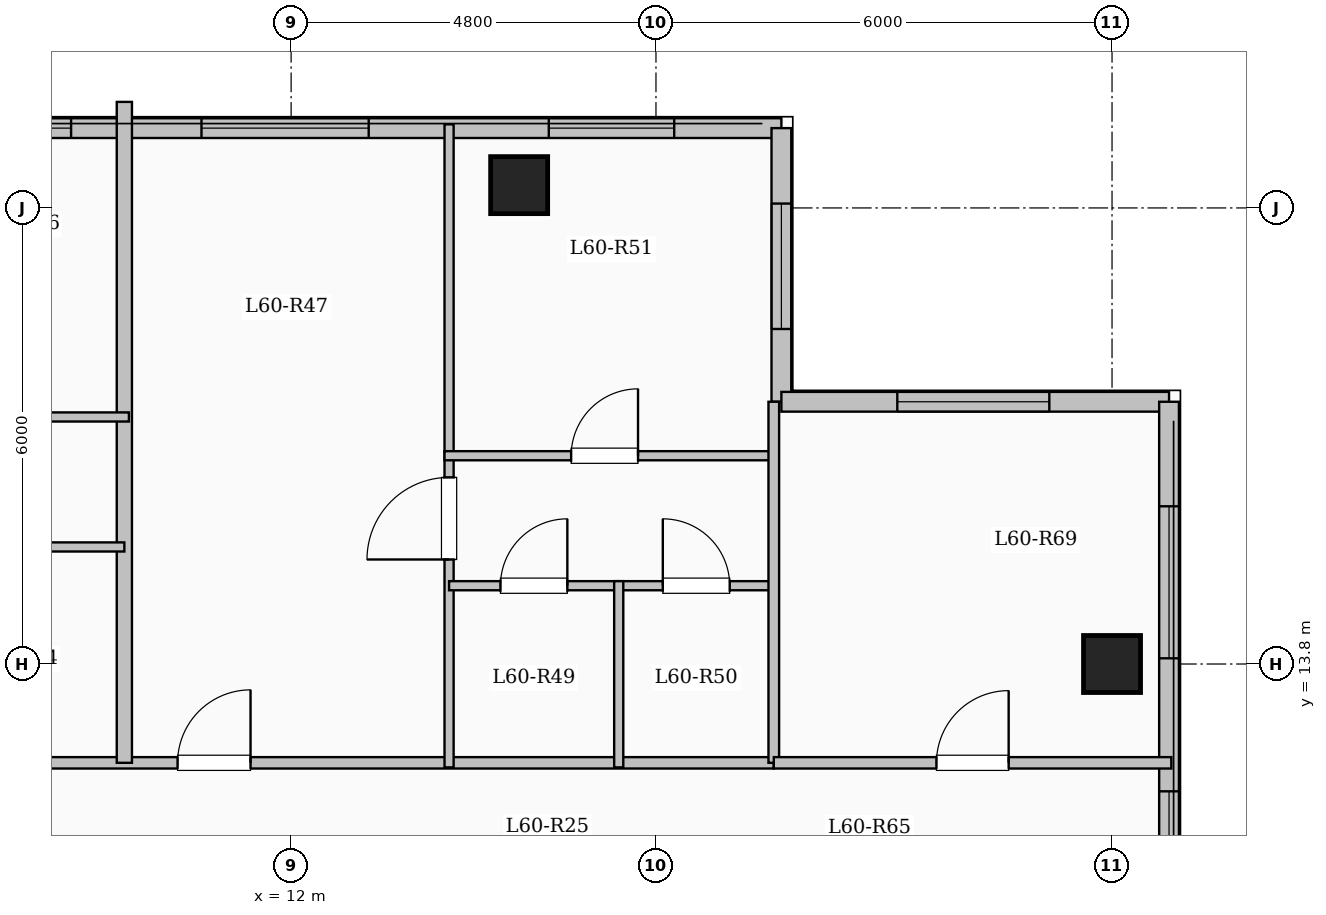
"""IFC4 building model, lengths in metres.
Left out: names, types, materials, properties, quantities, classifications, styles, units other than length and angle.
Written with IfcOpenShell. Run it as: python <this file> out.ifc"""

import sys

from ifc_helpers import new_model, si_unit, direction, frame, frame_2d, origin, origin_2d, place, context, subcontext, project, spatial, rectangle, extrude, element, fill, save


model = new_model("IFC4")
c1 = context("Model", 3, precision=1e-05, world=origin(), true_north=direction((0.0, 1.0)))
c2 = subcontext(c1, "Body", "Model", "MODEL_VIEW")
j1 = project(units=[si_unit("LENGTHUNIT", "METRE"), si_unit("PLANEANGLEUNIT", "RADIAN")], contexts=[c1])
p1 = place(None, origin())
s1 = spatial("IfcSite", under=j1, at=p1, CompositionType="ELEMENT")
p2 = place(p1, origin())
s2 = spatial("IfcBuilding", under=s1, at=p2, CompositionType="ELEMENT")
p3 = place(p2, frame((0.0, 0.0, 220.4)))
s3 = spatial("IfcBuildingStorey", under=s2, at=p3, CompositionType="ELEMENT", Elevation=220.4)
for number, where, z_axis, x_axis in (
    (1, (15.0, 20.1, 0.0), (0.0, 0.0, 1.0), (1.0, 0.0, 0.0)),
    (2, (22.8, 13.8, 0.0), (0.0, 0.0, 1.0), (1.0, 0.0, 0.0)),
):
    element("IfcColumn", number, at=place(p3, frame(where, z_axis=z_axis, x_axis=x_axis)), inside=s3, PredefinedType="COLUMN", context=c2, shape_type="SweptSolid", body=[
        extrude(rectangle(XDim=0.75, YDim=0.75, at=origin_2d()), origin(), (0.0, 0.0, 1.0), 3.35),
    ])
p4 = place(p3, frame((7.35, 20.85, 0.0), z_axis=(0.0, 0.0, 1.0), x_axis=(1.0, 0.0, 0.0)))
e3 = element("IfcWall", 3, at=p4, inside=s3, PredefinedType="SOLIDWALL", context=c2, shape_type="SweptSolid", body=[
    extrude(rectangle(XDim=11.1, YDim=0.26, at=frame_2d((5.55, 0.0))), origin(), (0.0, 0.0, 1.0), 3.1),
])
p5 = place(p4, frame((0.555, 0.0, 0.95)))
e4 = element("IfcOpeningElement", 4, at=p5, cuts=e3, PredefinedType="OPENING", context=c2, shape_type="SweptSolid", body=[
    extrude(rectangle(XDim=1.2, YDim=1.5, at=frame_2d((0.6, 0.75))), frame((0.0, 0.14, 0.0), z_axis=(0.0, -1.0, 0.0), x_axis=(1.0, 0.0, 0.0)), (0.0, 0.0, 1.0), 0.28),
])
p6 = place(p4, frame((3.471, 0.0, 0.9)))
e5 = element("IfcOpeningElement", 5, at=p6, cuts=e3, PredefinedType="OPENING", context=c2, shape_type="SweptSolid", body=[
    extrude(rectangle(XDim=2.2, YDim=1.75, at=frame_2d((1.1, 0.875))), frame((0.0, 0.14, 0.0), z_axis=(0.0, -1.0, 0.0), x_axis=(1.0, 0.0, 0.0)), (0.0, 0.0, 1.0), 0.28),
])
p7 = place(p4, frame((8.04, 0.0, 0.9)))
e6 = element("IfcOpeningElement", 6, at=p7, cuts=e3, PredefinedType="OPENING", context=c2, shape_type="SweptSolid", body=[
    extrude(rectangle(XDim=1.65, YDim=1.6, at=frame_2d((0.825, 0.8))), frame((0.0, 0.14, 0.0), z_axis=(0.0, -1.0, 0.0), x_axis=(1.0, 0.0, 0.0)), (0.0, 0.0, 1.0), 0.28),
])
p8 = place(p3, frame((18.45, 20.85, 0.0), z_axis=(0.0, 0.0, 1.0), x_axis=(0.0, -1.0, 0.0)))
e7 = element("IfcWall", 7, at=p8, inside=s3, PredefinedType="SOLIDWALL", context=c2, shape_type="SweptSolid", body=[
    extrude(rectangle(XDim=3.6, YDim=0.26, at=frame_2d((1.8, 0.0))), origin(), (0.0, 0.0, 1.0), 3.1),
])
p9 = place(p8, frame((0.992, 0.0, 0.9)))
e8 = element("IfcOpeningElement", 8, at=p9, cuts=e7, PredefinedType="OPENING", context=c2, shape_type="SweptSolid", body=[
    extrude(rectangle(XDim=1.65, YDim=1.6, at=frame_2d((0.825, 0.8))), frame((0.0, 0.14, 0.0), z_axis=(0.0, -1.0, 0.0), x_axis=(1.0, 0.0, 0.0)), (0.0, 0.0, 1.0), 0.28),
])
p10 = place(p3, frame((18.45, 17.25, 0.0), z_axis=(0.0, 0.0, 1.0), x_axis=(1.0, 0.0, 0.0)))
e9 = element("IfcWall", 9, at=p10, inside=s3, PredefinedType="SOLIDWALL", context=c2, shape_type="SweptSolid", body=[
    extrude(rectangle(XDim=5.1, YDim=0.26, at=frame_2d((2.55, 0.0))), origin(), (0.0, 0.0, 1.0), 3.1),
])
p11 = place(p10, frame((1.525, 0.0, 0.9)))
e10 = element("IfcOpeningElement", 10, at=p11, cuts=e9, PredefinedType="OPENING", context=c2, shape_type="SweptSolid", body=[
    extrude(rectangle(XDim=2.0, YDim=1.7, at=frame_2d((1.0, 0.85))), frame((0.0, 0.14, 0.0), z_axis=(0.0, -1.0, 0.0), x_axis=(1.0, 0.0, 0.0)), (0.0, 0.0, 1.0), 0.28),
])
p12 = place(p3, frame((23.55, 17.25, 0.0), z_axis=(0.0, 0.0, 1.0), x_axis=(0.0, -1.0, 0.0)))
e11 = element("IfcWall", 11, at=p12, inside=s3, PredefinedType="SOLIDWALL", context=c2, shape_type="SweptSolid", body=[
    extrude(rectangle(XDim=34.5, YDim=0.26, at=frame_2d((17.25, 0.0))), origin(), (0.0, 0.0, 1.0), 3.1),
])
p13 = place(p12, frame((1.375, 0.0, 0.9)))
e12 = element("IfcOpeningElement", 12, at=p13, cuts=e11, PredefinedType="OPENING", context=c2, shape_type="SweptSolid", body=[
    extrude(rectangle(XDim=2.0, YDim=1.7, at=frame_2d((1.0, 0.85))), frame((0.0, 0.14, 0.0), z_axis=(0.0, -1.0, 0.0), x_axis=(1.0, 0.0, 0.0)), (0.0, 0.0, 1.0), 0.28),
])
p14 = place(p12, frame((5.125, 0.0, 0.95)))
e13 = element("IfcOpeningElement", 13, at=p14, cuts=e11, PredefinedType="OPENING", context=c2, shape_type="SweptSolid", body=[
    extrude(rectangle(XDim=1.0, YDim=1.5, at=frame_2d((0.5, 0.75))), frame((0.0, 0.14, 0.0), z_axis=(0.0, -1.0, 0.0), x_axis=(1.0, 0.0, 0.0)), (0.0, 0.0, 1.0), 0.28),
])
p15 = place(p12, frame((8.375, 0.0, 0.9)))
e14 = element("IfcOpeningElement", 14, at=p15, cuts=e11, PredefinedType="OPENING", context=c2, shape_type="SweptSolid", body=[
    extrude(rectangle(XDim=2.0, YDim=1.7, at=frame_2d((1.0, 0.85))), frame((0.0, 0.14, 0.0), z_axis=(0.0, -1.0, 0.0), x_axis=(1.0, 0.0, 0.0)), (0.0, 0.0, 1.0), 0.28),
])
p16 = place(p12, frame((13.2, 0.0, 0.9)))
e15 = element("IfcOpeningElement", 15, at=p16, cuts=e11, PredefinedType="OPENING", context=c2, shape_type="SweptSolid", body=[
    extrude(rectangle(XDim=1.65, YDim=1.6, at=frame_2d((0.825, 0.8))), frame((0.0, 0.14, 0.0), z_axis=(0.0, -1.0, 0.0), x_axis=(1.0, 0.0, 0.0)), (0.0, 0.0, 1.0), 0.28),
])
p17 = place(p12, frame((19.05, 0.0, 0.9)))
e16 = element("IfcOpeningElement", 16, at=p17, cuts=e11, PredefinedType="OPENING", context=c2, shape_type="SweptSolid", body=[
    extrude(rectangle(XDim=2.2, YDim=1.75, at=frame_2d((1.1, 0.875))), frame((0.0, 0.14, 0.0), z_axis=(0.0, -1.0, 0.0), x_axis=(1.0, 0.0, 0.0)), (0.0, 0.0, 1.0), 0.28),
])
p18 = place(p12, frame((24.975, 0.0, 0.95)))
e17 = element("IfcOpeningElement", 17, at=p18, cuts=e11, PredefinedType="OPENING", context=c2, shape_type="SweptSolid", body=[
    extrude(rectangle(XDim=1.2, YDim=1.5, at=frame_2d((0.6, 0.75))), frame((0.0, 0.14, 0.0), z_axis=(0.0, -1.0, 0.0), x_axis=(1.0, 0.0, 0.0)), (0.0, 0.0, 1.0), 0.28),
])
p19 = place(p12, frame((29.475, 0.0, 0.9)))
e18 = element("IfcOpeningElement", 18, at=p19, cuts=e11, PredefinedType="OPENING", context=c2, shape_type="SweptSolid", body=[
    extrude(rectangle(XDim=2.2, YDim=1.75, at=frame_2d((1.1, 0.875))), frame((0.0, 0.14, 0.0), z_axis=(0.0, -1.0, 0.0), x_axis=(1.0, 0.0, 0.0)), (0.0, 0.0, 1.0), 0.28),
])
p20 = place(p3, frame((3.85, 12.5, 0.0), z_axis=(0.0, 0.0, 1.0), x_axis=(1.0, 0.0, 0.0)))
e19 = element("IfcWall", 19, at=p20, inside=s3, PredefinedType="PARTITIONING", context=c2, shape_type="SweptSolid", body=[
    extrude(rectangle(XDim=14.5, YDim=0.15, at=frame_2d((7.25, 0.0))), origin(), (0.0, 0.0, 1.0), 3.1),
])
p21 = place(p20, frame((0.7, 0.0, 0.0)))
e20 = element("IfcOpeningElement", 20, at=p21, cuts=e19, PredefinedType="OPENING", context=c2, shape_type="SweptSolid", body=[
    extrude(rectangle(XDim=0.96, YDim=2.15, at=frame_2d((0.48, 1.075))), frame((0.0, 0.085, 0.0), z_axis=(0.0, -1.0, 0.0), x_axis=(1.0, 0.0, 0.0)), (0.0, 0.0, 1.0), 0.17),
])
p22 = place(p20, frame((6.656, 0.0, 0.0)))
e21 = element("IfcOpeningElement", 21, at=p22, cuts=e19, PredefinedType="OPENING", context=c2, shape_type="SweptSolid", body=[
    extrude(rectangle(XDim=0.96, YDim=2.15, at=frame_2d((0.48, 1.075))), frame((0.0, 0.085, 0.0), z_axis=(0.0, -1.0, 0.0), x_axis=(1.0, 0.0, 0.0)), (0.0, 0.0, 1.0), 0.17),
])
p23 = place(p3, frame((9.806, 12.5, 0.0), z_axis=(0.0, 0.0, 1.0), x_axis=(0.0, 1.0, 0.0)))
e22 = element("IfcWall", 22, at=p23, inside=s3, PredefinedType="SOLIDWALL", context=c2, shape_type="SweptSolid", body=[
    extrude(rectangle(XDim=8.695, YDim=0.2, at=frame_2d((4.348, 0.0))), origin(), (0.0, 0.0, 1.0), 3.1),
])
p24 = place(p3, frame((6.95, 15.34, 0.0), z_axis=(0.0, 0.0, 1.0), x_axis=(1.0, 0.0, 0.0)))
e23 = element("IfcWall", 23, at=p24, inside=s3, PredefinedType="PARTITIONING", context=c2, shape_type="SweptSolid", body=[
    extrude(rectangle(XDim=2.856, YDim=0.12, at=frame_2d((1.428, 0.0))), origin(), (0.0, 0.0, 1.0), 2.725),
])
p25 = place(p24, frame((0.988, 0.0, 0.0)))
e24 = element("IfcOpeningElement", 24, at=p25, cuts=e23, PredefinedType="OPENING", context=c2, shape_type="SweptSolid", body=[
    extrude(rectangle(XDim=0.88, YDim=2.1, at=frame_2d((0.44, 1.05))), frame((0.0, 0.07, 0.0), z_axis=(0.0, -1.0, 0.0), x_axis=(1.0, 0.0, 0.0)), (0.0, 0.0, 1.0), 0.14),
])
p26 = place(p3, frame((4.204, 17.05, 0.0), z_axis=(0.0, 0.0, 1.0), x_axis=(1.0, 0.0, 0.0)))
e25 = element("IfcWall", 25, at=p26, inside=s3, PredefinedType="PARTITIONING", context=c2, shape_type="SweptSolid", body=[
    extrude(rectangle(XDim=5.662, YDim=0.12, at=frame_2d((2.831, 0.0))), origin(), (0.0, 0.0, 1.0), 2.725),
])
p27 = place(p26, frame((0.93, 0.0, 0.0)))
e26 = element("IfcOpeningElement", 26, at=p27, cuts=e25, PredefinedType="OPENING", context=c2, shape_type="SweptSolid", body=[
    extrude(rectangle(XDim=0.88, YDim=2.1, at=frame_2d((0.44, 1.05))), frame((0.0, 0.07, 0.0), z_axis=(0.0, -1.0, 0.0), x_axis=(1.0, 0.0, 0.0)), (0.0, 0.0, 1.0), 0.14),
])
p28 = place(p26, frame((3.671, 0.0, 0.0)))
e27 = element("IfcOpeningElement", 27, at=p28, cuts=e25, PredefinedType="OPENING", context=c2, shape_type="SweptSolid", body=[
    extrude(rectangle(XDim=0.88, YDim=2.1, at=frame_2d((0.44, 1.05))), frame((0.0, 0.07, 0.0), z_axis=(0.0, -1.0, 0.0), x_axis=(1.0, 0.0, 0.0)), (0.0, 0.0, 1.0), 0.14),
])
p29 = place(p3, frame((14.078, 12.44, 0.0), z_axis=(0.0, 0.0, 1.0), x_axis=(0.0, 1.0, 0.0)))
e28 = element("IfcWall", 28, at=p29, inside=s3, PredefinedType="PARTITIONING", context=c2, shape_type="SweptSolid", body=[
    extrude(rectangle(XDim=8.46, YDim=0.12, at=frame_2d((4.23, 0.0))), origin(), (0.0, 0.0, 1.0), 3.1),
])
p30 = place(p29, frame((2.735, 0.0, 0.0)))
e29 = element("IfcOpeningElement", 29, at=p30, cuts=e28, PredefinedType="OPENING", context=c2, shape_type="SweptSolid", body=[
    extrude(rectangle(XDim=1.08, YDim=2.15, at=frame_2d((0.54, 1.075))), frame((0.0, 0.07, 0.0), z_axis=(0.0, -1.0, 0.0), x_axis=(1.0, 0.0, 0.0)), (0.0, 0.0, 1.0), 0.14),
])
p31 = place(p3, frame((14.078, 14.83, 0.0), z_axis=(0.0, 0.0, 1.0), x_axis=(1.0, 0.0, 0.0)))
e30 = element("IfcWall", 30, at=p31, inside=s3, PredefinedType="PARTITIONING", context=c2, shape_type="SweptSolid", body=[
    extrude(rectangle(XDim=2.232, YDim=0.12, at=frame_2d((1.116, 0.0))), origin(), (0.0, 0.0, 1.0), 3.1),
])
p32 = place(p31, frame((0.676, 0.0, 0.0)))
e31 = element("IfcOpeningElement", 31, at=p32, cuts=e30, PredefinedType="OPENING", context=c2, shape_type="SweptSolid", body=[
    extrude(rectangle(XDim=0.88, YDim=2.1, at=frame_2d((0.44, 1.05))), frame((0.0, 0.07, 0.0), z_axis=(0.0, -1.0, 0.0), x_axis=(1.0, 0.0, 0.0)), (0.0, 0.0, 1.0), 0.14),
])
p33 = place(p3, frame((16.31, 14.83, 0.0), z_axis=(0.0, 0.0, 1.0), x_axis=(1.0, 0.0, 0.0)))
e32 = element("IfcWall", 32, at=p33, inside=s3, PredefinedType="PARTITIONING", context=c2, shape_type="SweptSolid", body=[
    extrude(rectangle(XDim=2.04, YDim=0.12, at=frame_2d((1.02, 0.0))), origin(), (0.0, 0.0, 1.0), 3.1),
])
p34 = place(p33, frame((0.58, 0.0, 0.0)))
e33 = element("IfcOpeningElement", 33, at=p34, cuts=e32, PredefinedType="OPENING", context=c2, shape_type="SweptSolid", body=[
    extrude(rectangle(XDim=0.88, YDim=2.1, at=frame_2d((0.44, 1.05))), frame((0.0, 0.07, 0.0), z_axis=(0.0, -1.0, 0.0), x_axis=(1.0, 0.0, 0.0)), (0.0, 0.0, 1.0), 0.14),
])
p35 = place(p3, frame((14.018, 16.54, 0.0), z_axis=(0.0, 0.0, 1.0), x_axis=(1.0, 0.0, 0.0)))
e34 = element("IfcWall", 34, at=p35, inside=s3, PredefinedType="PARTITIONING", context=c2, shape_type="SweptSolid", body=[
    extrude(rectangle(XDim=4.392, YDim=0.12, at=frame_2d((2.196, 0.0))), origin(), (0.0, 0.0, 1.0), 3.1),
])
p36 = place(p35, frame((1.666, 0.0, 0.0)))
e35 = element("IfcOpeningElement", 35, at=p36, cuts=e34, PredefinedType="OPENING", context=c2, shape_type="SweptSolid", body=[
    extrude(rectangle(XDim=0.88, YDim=2.1, at=frame_2d((0.44, 1.05))), frame((0.0, 0.07, 0.0), z_axis=(0.0, -1.0, 0.0), x_axis=(1.0, 0.0, 0.0)), (0.0, 0.0, 1.0), 0.14),
])
p37 = place(p3, frame((16.31, 12.44, 0.0), z_axis=(0.0, 0.0, 1.0), x_axis=(0.0, 1.0, 0.0)))
e36 = element("IfcWall", 36, at=p37, inside=s3, PredefinedType="PARTITIONING", context=c2, shape_type="SweptSolid", body=[
    extrude(rectangle(XDim=2.45, YDim=0.12, at=frame_2d((1.225, 0.0))), origin(), (0.0, 0.0, 1.0), 3.1),
])
p38 = place(p3, frame((18.35, 12.5, 0.0), z_axis=(0.0, 0.0, 1.0), x_axis=(0.0, 1.0, 0.0)))
e37 = element("IfcWall", 37, at=p38, inside=s3, PredefinedType="PARTITIONING", context=c2, shape_type="SweptSolid", body=[
    extrude(rectangle(XDim=4.75, YDim=0.14, at=frame_2d((2.375, 0.0))), origin(), (0.0, 0.0, 1.0), 3.1),
])
p39 = place(p3, frame((18.35, 12.5, 0.0), z_axis=(0.0, 0.0, 1.0), x_axis=(1.0, 0.0, 0.0)))
e38 = element("IfcWall", 38, at=p39, inside=s3, PredefinedType="PARTITIONING", context=c2, shape_type="SweptSolid", body=[
    extrude(rectangle(XDim=5.23, YDim=0.15, at=frame_2d((2.615, 0.0))), origin(), (0.0, 0.0, 1.0), 3.1),
])
p40 = place(p39, frame((2.14, 0.0, 0.0)))
e39 = element("IfcOpeningElement", 39, at=p40, cuts=e38, PredefinedType="OPENING", context=c2, shape_type="SweptSolid", body=[
    extrude(rectangle(XDim=0.95, YDim=2.15, at=frame_2d((0.475, 1.075))), frame((0.0, 0.085, 0.0), z_axis=(0.0, -1.0, 0.0), x_axis=(1.0, 0.0, 0.0)), (0.0, 0.0, 1.0), 0.17),
])
p41 = place(p5, origin())
e40 = element("IfcWindow", 40, at=p41, inside=s3, PartitioningType="SINGLE_PANEL", PredefinedType="WINDOW", context=c2, shape_type="SweptSolid", body=[
    extrude(rectangle(XDim=1.2, YDim=1.5, at=frame_2d((0.6, 0.75))), frame((0.0, 0.03, 0.0), z_axis=(0.0, -1.0, 0.0), x_axis=(1.0, 0.0, 0.0)), (0.0, 0.0, 1.0), 0.06),
])
fill(e4, e40)
p42 = place(p6, origin())
e41 = element("IfcWindow", 41, at=p42, inside=s3, PartitioningType="SINGLE_PANEL", PredefinedType="WINDOW", context=c2, shape_type="SweptSolid", body=[
    extrude(rectangle(XDim=2.2, YDim=1.75, at=frame_2d((1.1, 0.875))), frame((0.0, 0.03, 0.0), z_axis=(0.0, -1.0, 0.0), x_axis=(1.0, 0.0, 0.0)), (0.0, 0.0, 1.0), 0.06),
])
fill(e5, e41)
p43 = place(p7, origin())
e42 = element("IfcWindow", 42, at=p43, inside=s3, PartitioningType="SINGLE_PANEL", PredefinedType="WINDOW", context=c2, shape_type="SweptSolid", body=[
    extrude(rectangle(XDim=1.65, YDim=1.6, at=frame_2d((0.825, 0.8))), frame((0.0, 0.03, 0.0), z_axis=(0.0, -1.0, 0.0), x_axis=(1.0, 0.0, 0.0)), (0.0, 0.0, 1.0), 0.06),
])
fill(e6, e42)
p44 = place(p9, origin())
e43 = element("IfcWindow", 43, at=p44, inside=s3, PartitioningType="SINGLE_PANEL", PredefinedType="WINDOW", context=c2, shape_type="SweptSolid", body=[
    extrude(rectangle(XDim=1.65, YDim=1.6, at=frame_2d((0.825, 0.8))), frame((0.0, 0.03, 0.0), z_axis=(0.0, -1.0, 0.0), x_axis=(1.0, 0.0, 0.0)), (0.0, 0.0, 1.0), 0.06),
])
fill(e8, e43)
p45 = place(p11, origin())
e44 = element("IfcWindow", 44, at=p45, inside=s3, PartitioningType="SINGLE_PANEL", PredefinedType="WINDOW", context=c2, shape_type="SweptSolid", body=[
    extrude(rectangle(XDim=2.0, YDim=1.7, at=frame_2d((1.0, 0.85))), frame((0.0, 0.03, 0.0), z_axis=(0.0, -1.0, 0.0), x_axis=(1.0, 0.0, 0.0)), (0.0, 0.0, 1.0), 0.06),
])
fill(e10, e44)
p46 = place(p13, origin())
e45 = element("IfcWindow", 45, at=p46, inside=s3, PartitioningType="SINGLE_PANEL", PredefinedType="WINDOW", context=c2, shape_type="SweptSolid", body=[
    extrude(rectangle(XDim=2.0, YDim=1.7, at=frame_2d((1.0, 0.85))), frame((0.0, 0.03, 0.0), z_axis=(0.0, -1.0, 0.0), x_axis=(1.0, 0.0, 0.0)), (0.0, 0.0, 1.0), 0.06),
])
fill(e12, e45)
p47 = place(p14, origin())
e46 = element("IfcWindow", 46, at=p47, inside=s3, PartitioningType="SINGLE_PANEL", PredefinedType="WINDOW", context=c2, shape_type="SweptSolid", body=[
    extrude(rectangle(XDim=1.0, YDim=1.5, at=frame_2d((0.5, 0.75))), frame((0.0, 0.03, 0.0), z_axis=(0.0, -1.0, 0.0), x_axis=(1.0, 0.0, 0.0)), (0.0, 0.0, 1.0), 0.06),
])
fill(e13, e46)
p48 = place(p22, origin())
e47 = element("IfcDoor", 47, at=p48, inside=s3, OperationType="SINGLE_SWING_RIGHT", PredefinedType="DOOR", context=c2, shape_type="SweptSolid", body=[
    extrude(rectangle(XDim=0.96, YDim=2.15, at=frame_2d((0.48, 1.075))), frame((0.0, 0.025, 0.0), z_axis=(0.0, -1.0, 0.0), x_axis=(1.0, 0.0, 0.0)), (0.0, 0.0, 1.0), 0.05),
])
fill(e21, e47)
p49 = place(p30, origin())
e48 = element("IfcDoor", 48, at=p49, inside=s3, OperationType="SINGLE_SWING_LEFT", PredefinedType="DOOR", context=c2, shape_type="SweptSolid", body=[
    extrude(rectangle(XDim=1.08, YDim=2.15, at=frame_2d((0.54, 1.075))), frame((0.0, 0.025, 0.0), z_axis=(0.0, -1.0, 0.0), x_axis=(1.0, 0.0, 0.0)), (0.0, 0.0, 1.0), 0.05),
])
fill(e29, e48)
p50 = place(p32, origin())
e49 = element("IfcDoor", 49, at=p50, inside=s3, OperationType="SINGLE_SWING_RIGHT", PredefinedType="DOOR", context=c2, shape_type="SweptSolid", body=[
    extrude(rectangle(XDim=0.88, YDim=2.1, at=frame_2d((0.44, 1.05))), frame((0.0, 0.025, 0.0), z_axis=(0.0, -1.0, 0.0), x_axis=(1.0, 0.0, 0.0)), (0.0, 0.0, 1.0), 0.05),
])
fill(e31, e49)
p51 = place(p34, origin())
e50 = element("IfcDoor", 50, at=p51, inside=s3, OperationType="SINGLE_SWING_LEFT", PredefinedType="DOOR", context=c2, shape_type="SweptSolid", body=[
    extrude(rectangle(XDim=0.88, YDim=2.1, at=frame_2d((0.44, 1.05))), frame((0.0, 0.025, 0.0), z_axis=(0.0, -1.0, 0.0), x_axis=(1.0, 0.0, 0.0)), (0.0, 0.0, 1.0), 0.05),
])
fill(e33, e50)
p52 = place(p36, origin())
e51 = element("IfcDoor", 51, at=p52, inside=s3, OperationType="SINGLE_SWING_RIGHT", PredefinedType="DOOR", context=c2, shape_type="SweptSolid", body=[
    extrude(rectangle(XDim=0.88, YDim=2.1, at=frame_2d((0.44, 1.05))), frame((0.0, 0.025, 0.0), z_axis=(0.0, -1.0, 0.0), x_axis=(1.0, 0.0, 0.0)), (0.0, 0.0, 1.0), 0.05),
])
fill(e35, e51)
p53 = place(p40, origin())
e52 = element("IfcDoor", 52, at=p53, inside=s3, OperationType="SINGLE_SWING_RIGHT", PredefinedType="DOOR", context=c2, shape_type="SweptSolid", body=[
    extrude(rectangle(XDim=0.95, YDim=2.15, at=frame_2d((0.475, 1.075))), frame((0.0, 0.025, 0.0), z_axis=(0.0, -1.0, 0.0), x_axis=(1.0, 0.0, 0.0)), (0.0, 0.0, 1.0), 0.05),
])
fill(e39, e52)
save(model, sys.argv[1])
